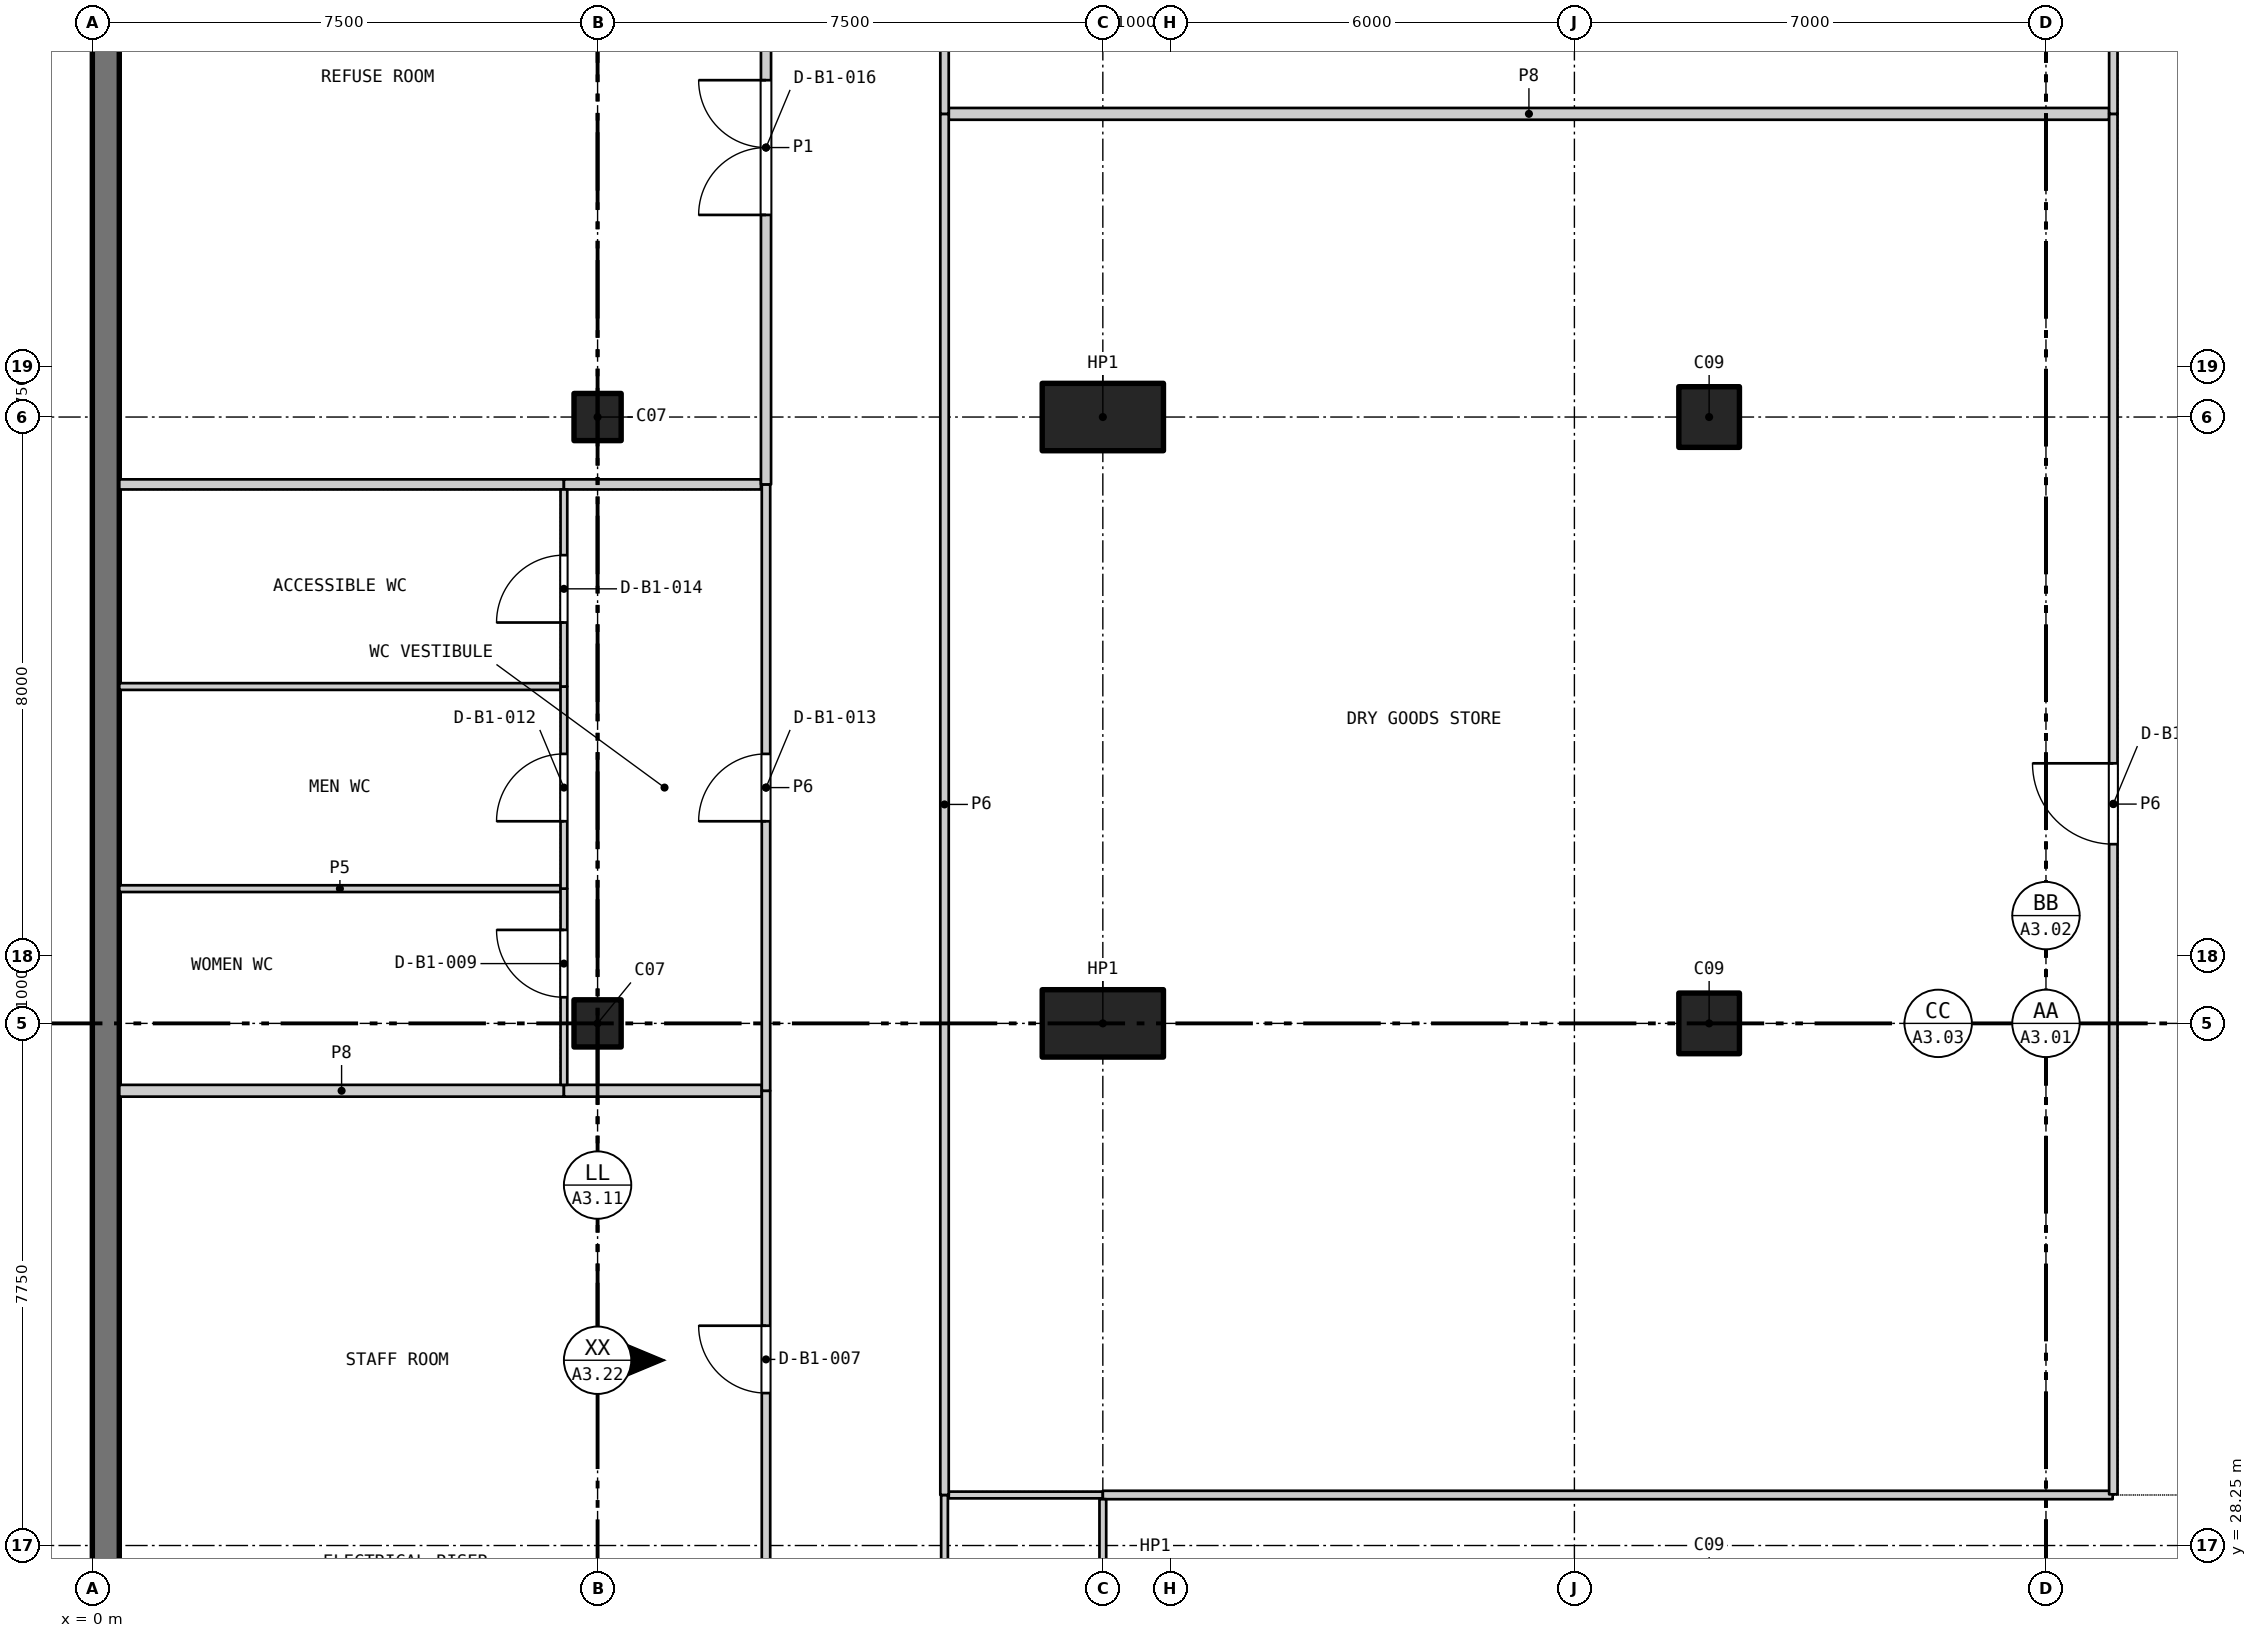
"""IFC4 building model, lengths in metres.
Left out: names, types, materials, properties, quantities, classifications, styles, units other than length and angle.
Written with IfcOpenShell. Run it as: python <this file> out.ifc"""

import sys

from ifc_helpers import new_model, si_unit, direction, frame, frame_2d, origin, origin_2d, place, context, subcontext, project, spatial, rectangle, extrude, element, fill, save


model = new_model("IFC4")
c1 = context("Model", 3, precision=1e-05, world=origin(), true_north=direction((0.0, 1.0)))
c2 = subcontext(c1, "Body", "Model", "MODEL_VIEW")
j1 = project(units=[si_unit("LENGTHUNIT", "METRE"), si_unit("PLANEANGLEUNIT", "RADIAN")], contexts=[c1])
p1 = place(None, origin())
s1 = spatial("IfcSite", under=j1, at=p1, CompositionType="ELEMENT")
p2 = place(p1, origin())
s2 = spatial("IfcBuilding", under=s1, at=p2, CompositionType="ELEMENT")
p3 = place(p2, frame((0.0, 0.0, -10.0)))
s3 = spatial("IfcBuildingStorey", under=s2, at=p3, CompositionType="ELEMENT", Elevation=-10.0)
for number, where, z_axis, x_axis in (
    (1, (24.0, 36.0, -1.4), (0.0, 0.0, 1.0), (1.0, 0.0, 0.0)),
    (2, (24.0, 45.0, -1.4), (0.0, 0.0, 1.0), (1.0, 0.0, 0.0)),
):
    element("IfcColumn", number, at=place(p3, frame(where, z_axis=z_axis, x_axis=x_axis)), inside=s3, PredefinedType="COLUMN", context=c2, shape_type="SweptSolid", body=[
        extrude(rectangle(XDim=0.9, YDim=0.9, at=origin_2d()), origin(), (0.0, 0.0, 1.0), 6.4),
    ])
for number, where, z_axis, x_axis in (
    (3, (7.5, 36.0, -1.4), (0.0, 0.0, 1.0), (1.0, 0.0, 0.0)),
    (4, (7.5, 45.0, -1.4), (0.0, 0.0, 1.0), (1.0, 0.0, 0.0)),
):
    element("IfcColumn", number, at=place(p3, frame(where, z_axis=z_axis, x_axis=x_axis)), inside=s3, PredefinedType="COLUMN", context=c2, shape_type="SweptSolid", body=[
        extrude(rectangle(XDim=0.7, YDim=0.7, at=origin_2d()), origin(), (0.0, 0.0, 1.0), 6.4),
    ])
p4 = place(p3, frame((0.2, 18.0, -1.4), z_axis=(0.0, 0.0, 1.0), x_axis=(0.0, 1.0, 0.0)))
e5 = element("IfcWall", 5, at=p4, inside=s3, PredefinedType="SOLIDWALL", context=c2, shape_type="SweptSolid", body=[
    extrude(rectangle(XDim=108.0, YDim=0.4, at=frame_2d((54.0, 0.0))), origin(), (0.0, 0.0, 1.0), 6.4),
])
for number, where, z_axis, x_axis in (
    (6, (15.0, 36.0, -1.4), (0.0, 0.0, 1.0), (1.0, 0.0, 0.0)),
    (7, (15.0, 45.0, -1.4), (0.0, 0.0, 1.0), (1.0, 0.0, 0.0)),
):
    element("IfcColumn", number, at=place(p3, frame(where, z_axis=z_axis, x_axis=x_axis)), inside=s3, PredefinedType="COLUMN", context=c2, shape_type="SweptSolid", body=[
        extrude(rectangle(XDim=1.8, YDim=1.0, at=origin_2d()), origin(), (0.0, 0.0, 1.0), 6.4),
    ])
p5 = place(p3, frame((12.712, 29.0, 0.0), z_axis=(0.0, 0.0, 1.0), x_axis=(1.0, 0.0, 0.0)))
e8 = element("IfcWall", 8, at=p5, inside=s3, PredefinedType="PARTITIONING", context=c2, shape_type="SweptSolid", body=[
    extrude(rectangle(XDim=2.288, YDim=0.1, at=frame_2d((1.144, 0.0))), origin(), (0.0, 0.0, 1.0), 4.75),
])
p6 = place(p3, frame((15.0, 29.0, 0.0), z_axis=(0.0, 0.0, 1.0), x_axis=(1.0, 0.0, 0.0)))
e9 = element("IfcWall", 9, at=p6, inside=s3, PredefinedType="PARTITIONING", context=c2, shape_type="SweptSolid", body=[
    extrude(rectangle(XDim=14.99, YDim=0.125, at=frame_2d((7.495, 0.0))), origin(), (0.0, 0.0, 1.0), 4.75),
])
p7 = place(p3, frame((0.4, 35.0, 0.0), z_axis=(0.0, 0.0, 1.0), x_axis=(1.0, 0.0, 0.0)))
e10 = element("IfcWall", 10, at=p7, inside=s3, PredefinedType="PARTITIONING", context=c2, shape_type="SweptSolid", body=[
    extrude(rectangle(XDim=6.6, YDim=0.175, at=frame_2d((3.3, 0.0))), origin(), (0.0, 0.0, 1.0), 4.75),
])
p8 = place(p3, frame((7.0, 35.0, 0.0), z_axis=(0.0, 0.0, 1.0), x_axis=(1.0, 0.0, 0.0)))
e11 = element("IfcWall", 11, at=p8, inside=s3, PredefinedType="PARTITIONING", context=c2, shape_type="SweptSolid", body=[
    extrude(rectangle(XDim=2.938, YDim=0.175, at=frame_2d((1.469, 0.0))), origin(), (0.0, 0.0, 1.0), 4.75),
])
for number, where, z_axis, x_axis in (
    (12, (0.4, 38.0, 0.0), (0.0, 0.0, 1.0), (1.0, 0.0, 0.0)),
    (13, (0.4, 41.0, 0.0), (0.0, 0.0, 1.0), (1.0, 0.0, 0.0)),
):
    element("IfcWall", number, at=place(p3, frame(where, z_axis=z_axis, x_axis=x_axis)), inside=s3, PredefinedType="PARTITIONING", context=c2, shape_type="SweptSolid", body=[
        extrude(rectangle(XDim=6.55, YDim=0.1, at=frame_2d((3.275, 0.0))), origin(), (0.0, 0.0, 1.0), 4.75),
    ])
p9 = place(p3, frame((0.4, 44.0, 0.0), z_axis=(0.0, 0.0, 1.0), x_axis=(1.0, 0.0, 0.0)))
e14 = element("IfcWall", 14, at=p9, inside=s3, PredefinedType="PARTITIONING", context=c2, shape_type="SweptSolid", body=[
    extrude(rectangle(XDim=6.6, YDim=0.15, at=frame_2d((3.3, 0.0))), origin(), (0.0, 0.0, 1.0), 4.75),
])
p10 = place(p3, frame((7.0, 44.0, 0.0), z_axis=(0.0, 0.0, 1.0), x_axis=(1.0, 0.0, 0.0)))
e15 = element("IfcWall", 15, at=p10, inside=s3, PredefinedType="PARTITIONING", context=c2, shape_type="SweptSolid", body=[
    extrude(rectangle(XDim=2.925, YDim=0.15, at=frame_2d((1.462, 0.0))), origin(), (0.0, 0.0, 1.0), 4.75),
])
p11 = place(p3, frame((12.712, 49.5, 0.0), z_axis=(0.0, 0.0, 1.0), x_axis=(1.0, 0.0, 0.0)))
e16 = element("IfcWall", 16, at=p11, inside=s3, PredefinedType="PARTITIONING", context=c2, shape_type="SweptSolid", body=[
    extrude(rectangle(XDim=17.225, YDim=0.175, at=frame_2d((8.613, 0.0))), origin(), (0.0, 0.0, 1.0), 4.75),
])
p12 = place(p3, frame((7.0, 35.087, 0.0), z_axis=(0.0, 0.0, 1.0), x_axis=(0.0, 1.0, 0.0)))
e17 = element("IfcWall", 17, at=p12, inside=s3, PredefinedType="PARTITIONING", context=c2, shape_type="SweptSolid", body=[
    extrude(rectangle(XDim=2.913, YDim=0.1, at=frame_2d((1.456, 0.0))), origin(), (0.0, 0.0, 1.0), 4.75),
])
p13 = place(p12, frame((1.3, 0.0, 0.0)))
e18 = element("IfcOpeningElement", 18, at=p13, cuts=e17, PredefinedType="OPENING", context=c2, shape_type="SweptSolid", body=[
    extrude(rectangle(XDim=1.0, YDim=2.1, at=frame_2d((0.5, 1.05))), frame((0.0, 0.06, 0.0), z_axis=(0.0, -1.0, 0.0), x_axis=(1.0, 0.0, 0.0)), (0.0, 0.0, 1.0), 0.12),
])
p14 = place(p3, frame((7.0, 38.0, 0.0), z_axis=(0.0, 0.0, 1.0), x_axis=(0.0, 1.0, 0.0)))
e19 = element("IfcWall", 19, at=p14, inside=s3, PredefinedType="PARTITIONING", context=c2, shape_type="SweptSolid", body=[
    extrude(rectangle(XDim=3.0, YDim=0.1, at=frame_2d((1.5, 0.0))), origin(), (0.0, 0.0, 1.0), 4.75),
])
p15 = place(p14, frame((1.0, 0.0, 0.0)))
e20 = element("IfcOpeningElement", 20, at=p15, cuts=e19, PredefinedType="OPENING", context=c2, shape_type="SweptSolid", body=[
    extrude(rectangle(XDim=1.0, YDim=2.1, at=frame_2d((0.5, 1.05))), frame((0.0, 0.06, 0.0), z_axis=(0.0, -1.0, 0.0), x_axis=(1.0, 0.0, 0.0)), (0.0, 0.0, 1.0), 0.12),
])
p16 = place(p3, frame((7.0, 41.0, 0.0), z_axis=(0.0, 0.0, 1.0), x_axis=(0.0, 1.0, 0.0)))
e21 = element("IfcWall", 21, at=p16, inside=s3, PredefinedType="PARTITIONING", context=c2, shape_type="SweptSolid", body=[
    extrude(rectangle(XDim=2.925, YDim=0.1, at=frame_2d((1.462, 0.0))), origin(), (0.0, 0.0, 1.0), 4.75),
])
p17 = place(p16, frame((0.95, 0.0, 0.0)))
e22 = element("IfcOpeningElement", 22, at=p17, cuts=e21, PredefinedType="OPENING", context=c2, shape_type="SweptSolid", body=[
    extrude(rectangle(XDim=1.0, YDim=2.1, at=frame_2d((0.5, 1.05))), frame((0.0, 0.06, 0.0), z_axis=(0.0, -1.0, 0.0), x_axis=(1.0, 0.0, 0.0)), (0.0, 0.0, 1.0), 0.12),
])
p18 = place(p3, frame((10.0, 27.062, 0.0), z_axis=(0.0, 0.0, 1.0), x_axis=(0.0, 1.0, 0.0)))
e23 = element("IfcWall", 23, at=p18, inside=s3, PredefinedType="PARTITIONING", context=c2, shape_type="SweptSolid", body=[
    extrude(rectangle(XDim=7.938, YDim=0.125, at=frame_2d((3.969, 0.0))), origin(), (0.0, 0.0, 1.0), 4.75),
])
p19 = place(p18, frame((3.45, 0.0, 0.0)))
e24 = element("IfcOpeningElement", 24, at=p19, cuts=e23, PredefinedType="OPENING", context=c2, shape_type="SweptSolid", body=[
    extrude(rectangle(XDim=1.0, YDim=2.1, at=frame_2d((0.5, 1.05))), frame((0.0, 0.073, 0.0), z_axis=(0.0, -1.0, 0.0), x_axis=(1.0, 0.0, 0.0)), (0.0, 0.0, 1.0), 0.145),
])
p20 = place(p3, frame((10.0, 35.0, 0.0), z_axis=(0.0, 0.0, 1.0), x_axis=(0.0, 1.0, 0.0)))
e25 = element("IfcWall", 25, at=p20, inside=s3, PredefinedType="PARTITIONING", context=c2, shape_type="SweptSolid", body=[
    extrude(rectangle(XDim=9.0, YDim=0.125, at=frame_2d((4.5, 0.0))), origin(), (0.0, 0.0, 1.0), 4.75),
])
p21 = place(p20, frame((4.0, 0.0, 0.0)))
e26 = element("IfcOpeningElement", 26, at=p21, cuts=e25, PredefinedType="OPENING", context=c2, shape_type="SweptSolid", body=[
    extrude(rectangle(XDim=1.0, YDim=2.1, at=frame_2d((0.5, 1.05))), frame((0.0, 0.073, 0.0), z_axis=(0.0, -1.0, 0.0), x_axis=(1.0, 0.0, 0.0)), (0.0, 0.0, 1.0), 0.145),
])
p22 = place(p3, frame((10.0, 44.0, 0.0), z_axis=(0.0, 0.0, 1.0), x_axis=(0.0, 1.0, 0.0)))
e27 = element("IfcWall", 27, at=p22, inside=s3, PredefinedType="PARTITIONING", context=c2, shape_type="SweptSolid", body=[
    extrude(rectangle(XDim=10.0, YDim=0.15, at=frame_2d((5.0, 0.0))), origin(), (0.0, 0.0, 1.0), 4.75),
])
p23 = place(p22, frame((4.0, 0.0, 0.0)))
e28 = element("IfcOpeningElement", 28, at=p23, cuts=e27, PredefinedType="OPENING", context=c2, shape_type="SweptSolid", body=[
    extrude(rectangle(XDim=2.0, YDim=2.1, at=frame_2d((1.0, 1.05))), frame((0.0, 0.085, 0.0), z_axis=(0.0, -1.0, 0.0), x_axis=(1.0, 0.0, 0.0)), (0.0, 0.0, 1.0), 0.17),
])
p24 = place(p3, frame((12.65, 27.05, 0.0), z_axis=(0.0, 0.0, 1.0), x_axis=(0.0, 1.0, 0.0)))
e29 = element("IfcWall", 29, at=p24, inside=s3, PredefinedType="PARTITIONING", context=c2, shape_type="SweptSolid", body=[
    extrude(rectangle(XDim=1.95, YDim=0.1, at=frame_2d((0.975, 0.0))), origin(), (0.0, 0.0, 1.0), 4.75),
])
p25 = place(p3, frame((12.65, 29.0, 0.0), z_axis=(0.0, 0.0, 1.0), x_axis=(0.0, 1.0, 0.0)))
e30 = element("IfcWall", 30, at=p25, inside=s3, PredefinedType="PARTITIONING", context=c2, shape_type="SweptSolid", body=[
    extrude(rectangle(XDim=20.5, YDim=0.125, at=frame_2d((10.25, 0.0))), origin(), (0.0, 0.0, 1.0), 4.75),
])
p26 = place(p3, frame((12.65, 49.5, 0.0), z_axis=(0.0, 0.0, 1.0), x_axis=(0.0, 1.0, 0.0)))
e31 = element("IfcWall", 31, at=p26, inside=s3, PredefinedType="PARTITIONING", context=c2, shape_type="SweptSolid", body=[
    extrude(rectangle(XDim=18.0, YDim=0.125, at=frame_2d((9.0, 0.0))), origin(), (0.0, 0.0, 1.0), 4.75),
])
p27 = place(p3, frame((15.0, 27.95, 0.0), z_axis=(0.0, 0.0, 1.0), x_axis=(0.0, 1.0, 0.0)))
e32 = element("IfcWall", 32, at=p27, inside=s3, PredefinedType="PARTITIONING", context=c2, shape_type="SweptSolid", body=[
    extrude(rectangle(XDim=0.988, YDim=0.1, at=frame_2d((0.494, 0.0))), origin(), (0.0, 0.0, 1.0), 4.75),
])
p28 = place(p3, frame((30.0, 29.01, 0.0), z_axis=(0.0, 0.0, 1.0), x_axis=(0.0, 1.0, 0.0)))
e33 = element("IfcWall", 33, at=p28, inside=s3, PredefinedType="PARTITIONING", context=c2, shape_type="SweptSolid", body=[
    extrude(rectangle(XDim=20.49, YDim=0.125, at=frame_2d((10.245, 0.0))), origin(), (0.0, 0.0, 1.0), 4.75),
])
p29 = place(p28, frame((9.65, 0.0, 0.0)))
e34 = element("IfcOpeningElement", 34, at=p29, cuts=e33, PredefinedType="OPENING", context=c2, shape_type="SweptSolid", body=[
    extrude(rectangle(XDim=1.2, YDim=2.1, at=frame_2d((0.6, 1.05))), frame((0.0, 0.073, 0.0), z_axis=(0.0, -1.0, 0.0), x_axis=(1.0, 0.0, 0.0)), (0.0, 0.0, 1.0), 0.145),
])
p30 = place(p3, frame((30.0, 49.5, 0.0), z_axis=(0.0, 0.0, 1.0), x_axis=(0.0, 1.0, 0.0)))
e35 = element("IfcWall", 35, at=p30, inside=s3, PredefinedType="PARTITIONING", context=c2, shape_type="SweptSolid", body=[
    extrude(rectangle(XDim=18.0, YDim=0.125, at=frame_2d((9.0, 0.0))), origin(), (0.0, 0.0, 1.0), 4.75),
])
p31 = place(p30, frame((8.4, 0.0, 0.0)))
e36 = element("IfcOpeningElement", 36, at=p31, cuts=e35, PredefinedType="OPENING", context=c2, shape_type="SweptSolid", body=[
    extrude(rectangle(XDim=1.2, YDim=2.1, at=frame_2d((0.6, 1.05))), frame((0.0, 0.073, 0.0), z_axis=(0.0, -1.0, 0.0), x_axis=(1.0, 0.0, 0.0)), (0.0, 0.0, 1.0), 0.145),
])
p32 = place(p19, origin())
e37 = element("IfcDoor", 37, at=p32, inside=s3, OperationType="SINGLE_SWING_RIGHT", PredefinedType="DOOR", context=c2, shape_type="SweptSolid", body=[
    extrude(rectangle(XDim=1.0, YDim=2.1, at=frame_2d((0.5, 1.05))), frame((0.0, 0.025, 0.0), z_axis=(0.0, -1.0, 0.0), x_axis=(1.0, 0.0, 0.0)), (0.0, 0.0, 1.0), 0.05),
])
fill(e24, e37)
p33 = place(p13, origin())
e38 = element("IfcDoor", 38, at=p33, inside=s3, OperationType="SINGLE_SWING_RIGHT", PredefinedType="DOOR", context=c2, shape_type="SweptSolid", body=[
    extrude(rectangle(XDim=1.0, YDim=2.1, at=frame_2d((0.5, 1.05))), frame((0.0, 0.025, 0.0), z_axis=(0.0, -1.0, 0.0), x_axis=(1.0, 0.0, 0.0)), (0.0, 0.0, 1.0), 0.05),
])
fill(e18, e38)
p34 = place(p29, origin())
e39 = element("IfcDoor", 39, at=p34, inside=s3, OperationType="SINGLE_SWING_RIGHT", PredefinedType="DOOR", context=c2, shape_type="SweptSolid", body=[
    extrude(rectangle(XDim=1.2, YDim=2.1, at=frame_2d((0.6, 1.05))), frame((0.0, 0.025, 0.0), z_axis=(0.0, -1.0, 0.0), x_axis=(1.0, 0.0, 0.0)), (0.0, 0.0, 1.0), 0.05),
])
fill(e34, e39)
p35 = place(p15, origin())
e40 = element("IfcDoor", 40, at=p35, inside=s3, OperationType="SINGLE_SWING_LEFT", PredefinedType="DOOR", context=c2, shape_type="SweptSolid", body=[
    extrude(rectangle(XDim=1.0, YDim=2.1, at=frame_2d((0.5, 1.05))), frame((0.0, 0.025, 0.0), z_axis=(0.0, -1.0, 0.0), x_axis=(1.0, 0.0, 0.0)), (0.0, 0.0, 1.0), 0.05),
])
fill(e20, e40)
p36 = place(p21, origin())
e41 = element("IfcDoor", 41, at=p36, inside=s3, OperationType="SINGLE_SWING_LEFT", PredefinedType="DOOR", context=c2, shape_type="SweptSolid", body=[
    extrude(rectangle(XDim=1.0, YDim=2.1, at=frame_2d((0.5, 1.05))), frame((0.0, 0.025, 0.0), z_axis=(0.0, -1.0, 0.0), x_axis=(1.0, 0.0, 0.0)), (0.0, 0.0, 1.0), 0.05),
])
fill(e26, e41)
p37 = place(p17, origin())
e42 = element("IfcDoor", 42, at=p37, inside=s3, OperationType="SINGLE_SWING_LEFT", PredefinedType="DOOR", context=c2, shape_type="SweptSolid", body=[
    extrude(rectangle(XDim=1.0, YDim=2.1, at=frame_2d((0.5, 1.05))), frame((0.0, 0.025, 0.0), z_axis=(0.0, -1.0, 0.0), x_axis=(1.0, 0.0, 0.0)), (0.0, 0.0, 1.0), 0.05),
])
fill(e22, e42)
p38 = place(p23, origin())
e43 = element("IfcDoor", 43, at=p38, inside=s3, OperationType="DOUBLE_DOOR_SINGLE_SWING", PredefinedType="DOOR", context=c2, shape_type="SweptSolid", body=[
    extrude(rectangle(XDim=2.0, YDim=2.1, at=frame_2d((1.0, 1.05))), frame((0.0, 0.025, 0.0), z_axis=(0.0, -1.0, 0.0), x_axis=(1.0, 0.0, 0.0)), (0.0, 0.0, 1.0), 0.05),
])
fill(e28, e43)
save(model, sys.argv[1])
